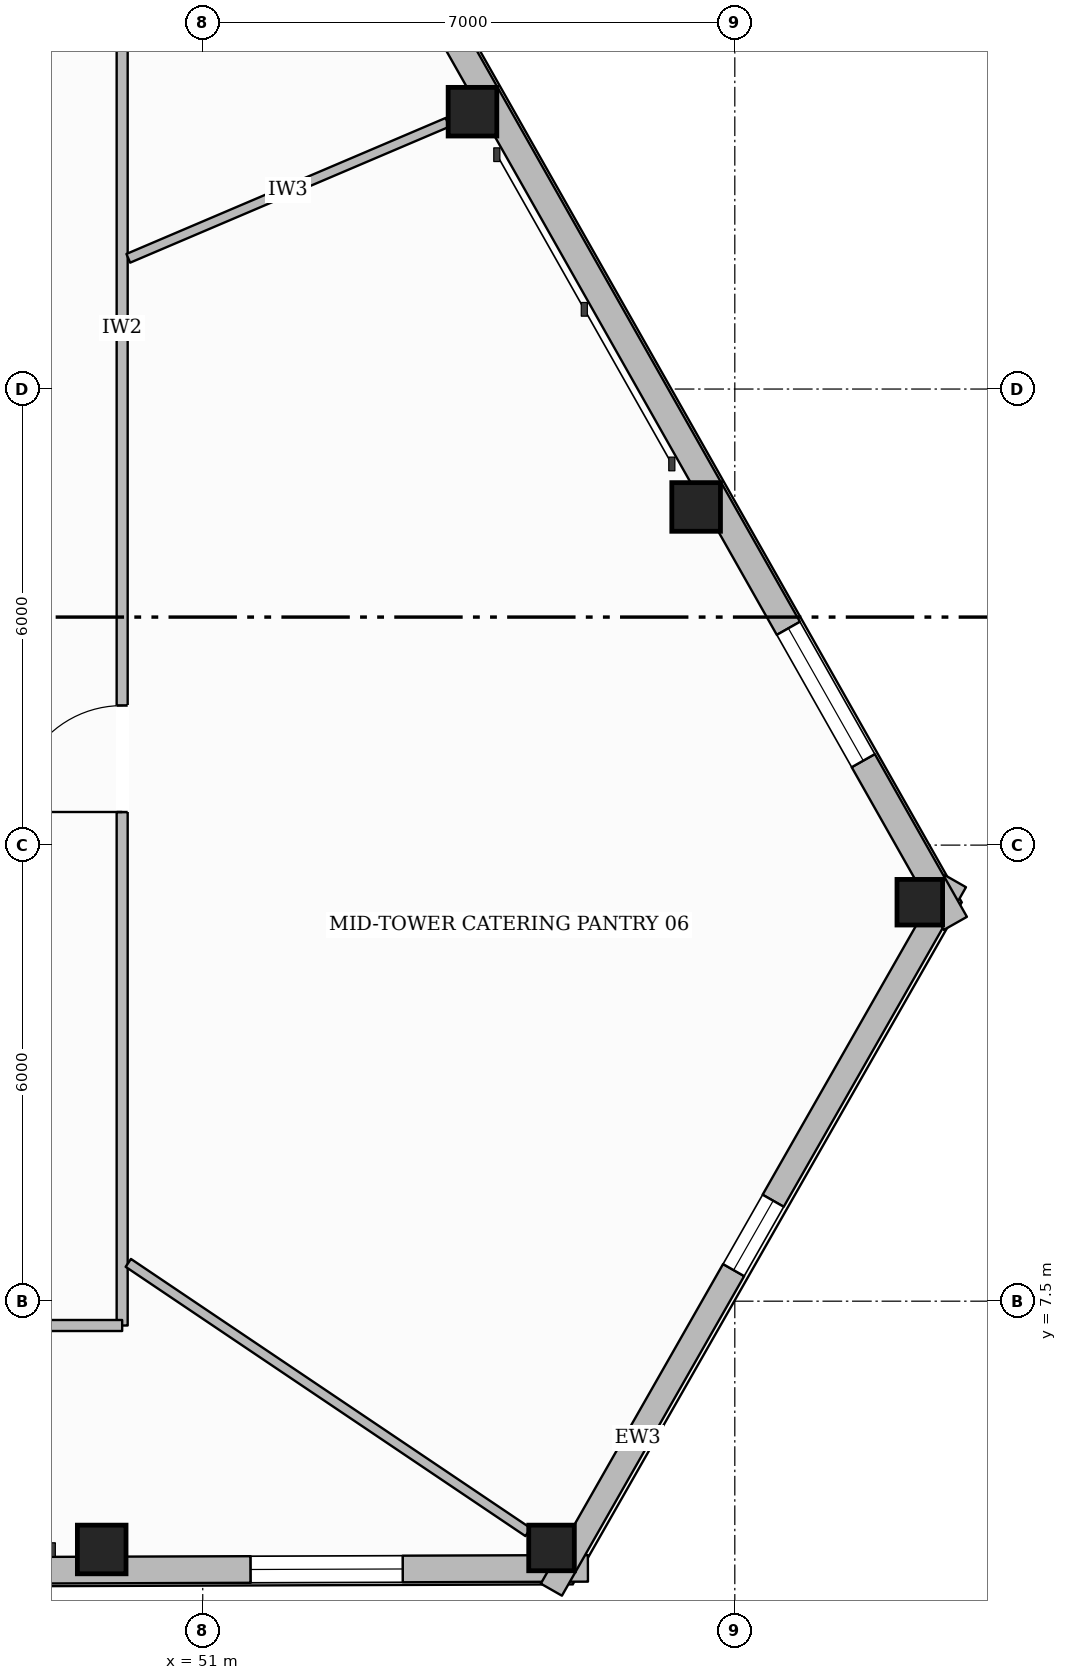
"""IFC4 building model, lengths in metres.
Left out: names, types, materials, properties, quantities, classifications, styles, units other than length and angle.
Written with IfcOpenShell. Run it as: python <this file> out.ifc"""

import sys

from ifc_helpers import new_model, si_unit, direction, frame, frame_2d, origin, origin_2d, place, context, subcontext, project, spatial, rectangle, hollow_rectangle, extrude, element, fill, save


model = new_model("IFC4")
c1 = context("Model", 3, precision=1e-05, world=origin(), true_north=direction((0.0, 1.0)))
c2 = subcontext(c1, "Body", "Model", "MODEL_VIEW")
j1 = project(units=[si_unit("LENGTHUNIT", "METRE"), si_unit("PLANEANGLEUNIT", "RADIAN")], contexts=[c1])
p1 = place(None, origin())
s1 = spatial("IfcSite", under=j1, at=p1, CompositionType="ELEMENT")
p2 = place(p1, origin())
s2 = spatial("IfcBuilding", under=s1, at=p2, CompositionType="ELEMENT")
p3 = place(p2, frame((0.0, 0.0, 160.0)))
s3 = spatial("IfcBuildingStorey", under=s2, at=p3, CompositionType="ELEMENT", Elevation=160.0)
p4 = place(p3, frame((49.671, 4.233, 0.0), z_axis=(0.0, 0.0, 1.0), x_axis=(1.0, 0.0, 0.0)))
e1 = element("IfcColumn", 1, at=p4, inside=s3, PredefinedType="COLUMN", context=c2, shape_type="SweptSolid", body=[
    extrude(hollow_rectangle(XDim=0.64, YDim=0.64, WallThickness=0.028, at=origin_2d()), origin(), (0.0, 0.0, 1.0), 4.75),
])
for number, where, z_axis, x_axis in (
    (2, (55.589, 4.253, 0.0), (0.0, 0.0, 1.0), (1.0, 0.0, 0.0)),
    (3, (60.434, 12.749, 0.0), (0.0, 0.0, 1.0), (1.0, 0.0, 0.0)),
):
    element("IfcColumn", number, at=place(p3, frame(where, z_axis=z_axis, x_axis=x_axis)), inside=s3, PredefinedType="COLUMN", context=c2, shape_type="SweptSolid", body=[
        extrude(hollow_rectangle(XDim=0.6, YDim=0.6, WallThickness=0.028, at=origin_2d()), origin(), (0.0, 0.0, 1.0), 4.75),
    ])
for number, where, z_axis, x_axis in (
    (4, (57.491, 17.949, 0.0), (0.0, 0.0, 1.0), (1.0, 0.0, 0.0)),
    (5, (54.549, 23.149, 0.0), (0.0, 0.0, 1.0), (1.0, 0.0, 0.0)),
):
    element("IfcColumn", number, at=place(p3, frame(where, z_axis=z_axis, x_axis=x_axis)), inside=s3, PredefinedType="COLUMN", context=c2, shape_type="SweptSolid", body=[
        extrude(hollow_rectangle(XDim=0.64, YDim=0.64, WallThickness=0.028, at=origin_2d()), origin(), (0.0, 0.0, 1.0), 4.75),
    ])
p5 = place(p3, frame((56.067, 3.985, 0.0), z_axis=(0.0, 0.0, 1.0), x_axis=(-0.999994307151, -0.003374265262, 0.0)))
e6 = element("IfcWall", 6, at=p5, inside=s3, PredefinedType="STANDARD", context=c2, shape_type="SweptSolid", body=[
    extrude(rectangle(XDim=36.466, YDim=0.35, at=frame_2d((18.233, 0.0))), origin(), (0.0, 0.0, 1.0), 4.282),
])
p6 = place(p5, frame((32.026, 0.0, 0.65)))
e7 = element("IfcOpeningElement", 7, at=p6, cuts=e6, PredefinedType="OPENING", context=c2, shape_type="SweptSolid", body=[
    extrude(rectangle(XDim=2.0, YDim=2.25, at=frame_2d((1.0, 1.125))), frame((0.0, 0.185, 0.0), z_axis=(0.0, -1.0, 0.0), x_axis=(1.0, 0.0, 0.0)), (0.0, 0.0, 1.0), 0.37),
])
p7 = place(p5, frame((2.437, 0.0, 0.65)))
e8 = element("IfcOpeningElement", 8, at=p7, cuts=e6, PredefinedType="OPENING", context=c2, shape_type="SweptSolid", body=[
    extrude(rectangle(XDim=2.0, YDim=2.25, at=frame_2d((1.0, 1.125))), frame((0.0, 0.185, 0.0), z_axis=(0.0, -1.0, 0.0), x_axis=(1.0, 0.0, 0.0)), (0.0, 0.0, 1.0), 0.37),
])
p8 = place(p3, frame((60.903, 13.026, 0.0), z_axis=(0.0, 0.0, 1.0), x_axis=(-0.495408589086, -0.86866007728, 0.0)))
e9 = element("IfcWall", 9, at=p8, inside=s3, PredefinedType="STANDARD", context=c2, shape_type="SweptSolid", body=[
    extrude(rectangle(XDim=10.73, YDim=0.32, at=frame_2d((5.365, 0.0))), origin(), (0.0, 0.0, 1.0), 4.282),
])
p9 = place(p8, frame((4.84, 0.0, 0.65)))
e10 = element("IfcOpeningElement", 10, at=p9, cuts=e9, PredefinedType="OPENING", context=c2, shape_type="SweptSolid", body=[
    extrude(rectangle(XDim=1.05, YDim=1.7, at=frame_2d((0.525, 0.85))), frame((0.0, 0.17, 0.0), z_axis=(0.0, -1.0, 0.0), x_axis=(1.0, 0.0, 0.0)), (0.0, 0.0, 1.0), 0.34),
])
p10 = place(p3, frame((42.777, 44.5, 0.0), z_axis=(0.0, 0.0, 1.0), x_axis=(0.492483231086, -0.870321933022, 0.0)))
e11 = element("IfcWall", 11, at=p10, inside=s3, PredefinedType="STANDARD", context=c2, shape_type="SweptSolid", body=[
    extrude(rectangle(XDim=36.803, YDim=0.35, at=frame_2d((18.401, 0.0))), origin(), (0.0, 0.0, 1.0), 4.282),
])
p11 = place(p10, frame((32.343, 0.0, 0.65)))
e12 = element("IfcOpeningElement", 12, at=p11, cuts=e11, PredefinedType="OPENING", context=c2, shape_type="SweptSolid", body=[
    extrude(rectangle(XDim=2.0, YDim=2.25, at=frame_2d((1.0, 1.125))), frame((0.0, 0.185, 0.0), z_axis=(0.0, -1.0, 0.0), x_axis=(1.0, 0.0, 0.0)), (0.0, 0.0, 1.0), 0.37),
])
p12 = place(p10, frame((2.468, 0.0, 0.65)))
e13 = element("IfcOpeningElement", 13, at=p12, cuts=e11, PredefinedType="OPENING", context=c2, shape_type="SweptSolid", body=[
    extrude(rectangle(XDim=2.0, YDim=2.25, at=frame_2d((1.0, 1.125))), frame((0.0, 0.185, 0.0), z_axis=(0.0, -1.0, 0.0), x_axis=(1.0, 0.0, 0.0)), (0.0, 0.0, 1.0), 0.37),
])
p13 = place(p3, frame((49.94, 7.18, 0.0), z_axis=(0.0, 0.0, 1.0), x_axis=(0.0, 1.0, 0.0)))
e14 = element("IfcWall", 14, at=p13, inside=s3, PredefinedType="PARTITIONING", context=c2, shape_type="SweptSolid", body=[
    extrude(rectangle(XDim=17.84, YDim=0.145, at=frame_2d((8.92, 0.0))), origin(), (0.0, 0.0, 1.0), 4.489),
])
p14 = place(p13, frame((6.756, 0.0, 0.0)))
e15 = element("IfcOpeningElement", 15, at=p14, cuts=e14, PredefinedType="OPENING", context=c2, shape_type="SweptSolid", body=[
    extrude(rectangle(XDim=1.4, YDim=2.2, at=frame_2d((0.7, 1.1))), frame((0.0, 0.083, 0.0), z_axis=(0.0, -1.0, 0.0), x_axis=(1.0, 0.0, 0.0)), (0.0, 0.0, 1.0), 0.165),
])
p15 = place(p3, frame((26.06, 7.18, 0.0), z_axis=(0.0, 0.0, 1.0), x_axis=(1.0, 0.0, 0.0)))
e16 = element("IfcWall", 16, at=p15, inside=s3, PredefinedType="PARTITIONING", context=c2, shape_type="SweptSolid", body=[
    extrude(rectangle(XDim=23.88, YDim=0.145, at=frame_2d((11.94, 0.0))), origin(), (0.0, 0.0, 1.0), 4.75),
])
p16 = place(p15, frame((4.5, 0.0, 0.0)))
e17 = element("IfcOpeningElement", 17, at=p16, cuts=e16, PredefinedType="OPENING", context=c2, shape_type="SweptSolid", body=[
    extrude(rectangle(XDim=0.88, YDim=2.1, at=frame_2d((0.44, 1.05))), frame((0.0, 0.083, 0.0), z_axis=(0.0, -1.0, 0.0), x_axis=(1.0, 0.0, 0.0)), (0.0, 0.0, 1.0), 0.165),
])
p17 = place(p15, frame((7.02, 0.0, 0.0)))
e18 = element("IfcOpeningElement", 18, at=p17, cuts=e16, PredefinedType="OPENING", context=c2, shape_type="SweptSolid", body=[
    extrude(rectangle(XDim=0.88, YDim=2.1, at=frame_2d((0.44, 1.05))), frame((0.0, 0.083, 0.0), z_axis=(0.0, -1.0, 0.0), x_axis=(1.0, 0.0, 0.0)), (0.0, 0.0, 1.0), 0.165),
])
p18 = place(p15, frame((9.4, 0.0, 0.0)))
e19 = element("IfcOpeningElement", 19, at=p18, cuts=e16, PredefinedType="OPENING", context=c2, shape_type="SweptSolid", body=[
    extrude(rectangle(XDim=0.96, YDim=2.1, at=frame_2d((0.48, 1.05))), frame((0.0, 0.083, 0.0), z_axis=(0.0, -1.0, 0.0), x_axis=(1.0, 0.0, 0.0)), (0.0, 0.0, 1.0), 0.165),
])
p19 = place(p15, frame((1.421, 0.0, 0.0)))
e20 = element("IfcOpeningElement", 20, at=p19, cuts=e16, PredefinedType="OPENING", context=c2, shape_type="SweptSolid", body=[
    extrude(rectangle(XDim=1.02, YDim=2.15, at=frame_2d((0.51, 1.075))), frame((0.0, 0.083, 0.0), z_axis=(0.0, -1.0, 0.0), x_axis=(1.0, 0.0, 0.0)), (0.0, 0.0, 1.0), 0.165),
])
p20 = place(p15, frame((16.859, 0.0, 0.0)))
e21 = element("IfcOpeningElement", 21, at=p20, cuts=e16, PredefinedType="OPENING", context=c2, shape_type="SweptSolid", body=[
    extrude(rectangle(XDim=1.02, YDim=2.15, at=frame_2d((0.51, 1.075))), frame((0.0, 0.083, 0.0), z_axis=(0.0, -1.0, 0.0), x_axis=(1.0, 0.0, 0.0)), (0.0, 0.0, 1.0), 0.165),
])
p21 = place(p3, frame((50.021, 21.22, 0.0), z_axis=(0.0, 0.0, 1.0), x_axis=(0.920036117829, 0.391833564016, 0.0)))
e22 = element("IfcWall", 22, at=p21, inside=s3, PredefinedType="PARTITIONING", context=c2, shape_type="SweptSolid", body=[
    extrude(rectangle(XDim=4.565, YDim=0.125, at=frame_2d((2.283, 0.0))), origin(), (0.0, 0.0, 1.0), 4.75),
])
p22 = place(p3, frame((50.021, 8.004, 0.0), z_axis=(0.0, 0.0, 1.0), x_axis=(0.8294114468, -0.55863821201, 0.0)))
e23 = element("IfcWall", 23, at=p22, inside=s3, PredefinedType="PARTITIONING", context=c2, shape_type="SweptSolid", body=[
    extrude(rectangle(XDim=6.342, YDim=0.125, at=frame_2d((3.171, 0.0))), origin(), (0.0, 0.0, 1.0), 4.291),
])
p23 = place(p7, origin())
e24 = element("IfcWindow", 24, at=p23, inside=s3, PartitioningType="SINGLE_PANEL", PredefinedType="WINDOW", context=c2, shape_type="SweptSolid", body=[
    extrude(rectangle(XDim=2.0, YDim=2.25, at=frame_2d((1.0, 1.125))), frame((0.0, 0.03, 0.0), z_axis=(0.0, -1.0, 0.0), x_axis=(1.0, 0.0, 0.0)), (0.0, 0.0, 1.0), 0.06),
])
fill(e8, e24)
p24 = place(p11, origin())
e25 = element("IfcWindow", 25, at=p24, inside=s3, PartitioningType="SINGLE_PANEL", PredefinedType="WINDOW", context=c2, shape_type="SweptSolid", body=[
    extrude(rectangle(XDim=2.0, YDim=2.25, at=frame_2d((1.0, 1.125))), frame((0.0, 0.03, 0.0), z_axis=(0.0, -1.0, 0.0), x_axis=(1.0, 0.0, 0.0)), (0.0, 0.0, 1.0), 0.06),
])
fill(e12, e25)
p25 = place(p9, origin())
e26 = element("IfcWindow", 26, at=p25, inside=s3, PartitioningType="SINGLE_PANEL", PredefinedType="WINDOW", context=c2, shape_type="SweptSolid", body=[
    extrude(rectangle(XDim=1.05, YDim=1.7, at=frame_2d((0.525, 0.85))), frame((0.0, 0.03, 0.0), z_axis=(0.0, -1.0, 0.0), x_axis=(1.0, 0.0, 0.0)), (0.0, 0.0, 1.0), 0.06),
])
fill(e10, e26)
p26 = place(p14, origin())
e27 = element("IfcDoor", 27, at=p26, inside=s3, OperationType="SINGLE_SWING_LEFT", PredefinedType="DOOR", context=c2, shape_type="SweptSolid", body=[
    extrude(rectangle(XDim=1.4, YDim=2.2, at=frame_2d((0.7, 1.1))), frame((0.0, 0.025, 0.0), z_axis=(0.0, -1.0, 0.0), x_axis=(1.0, 0.0, 0.0)), (0.0, 0.0, 1.0), 0.05),
])
fill(e15, e27)
save(model, sys.argv[1])
